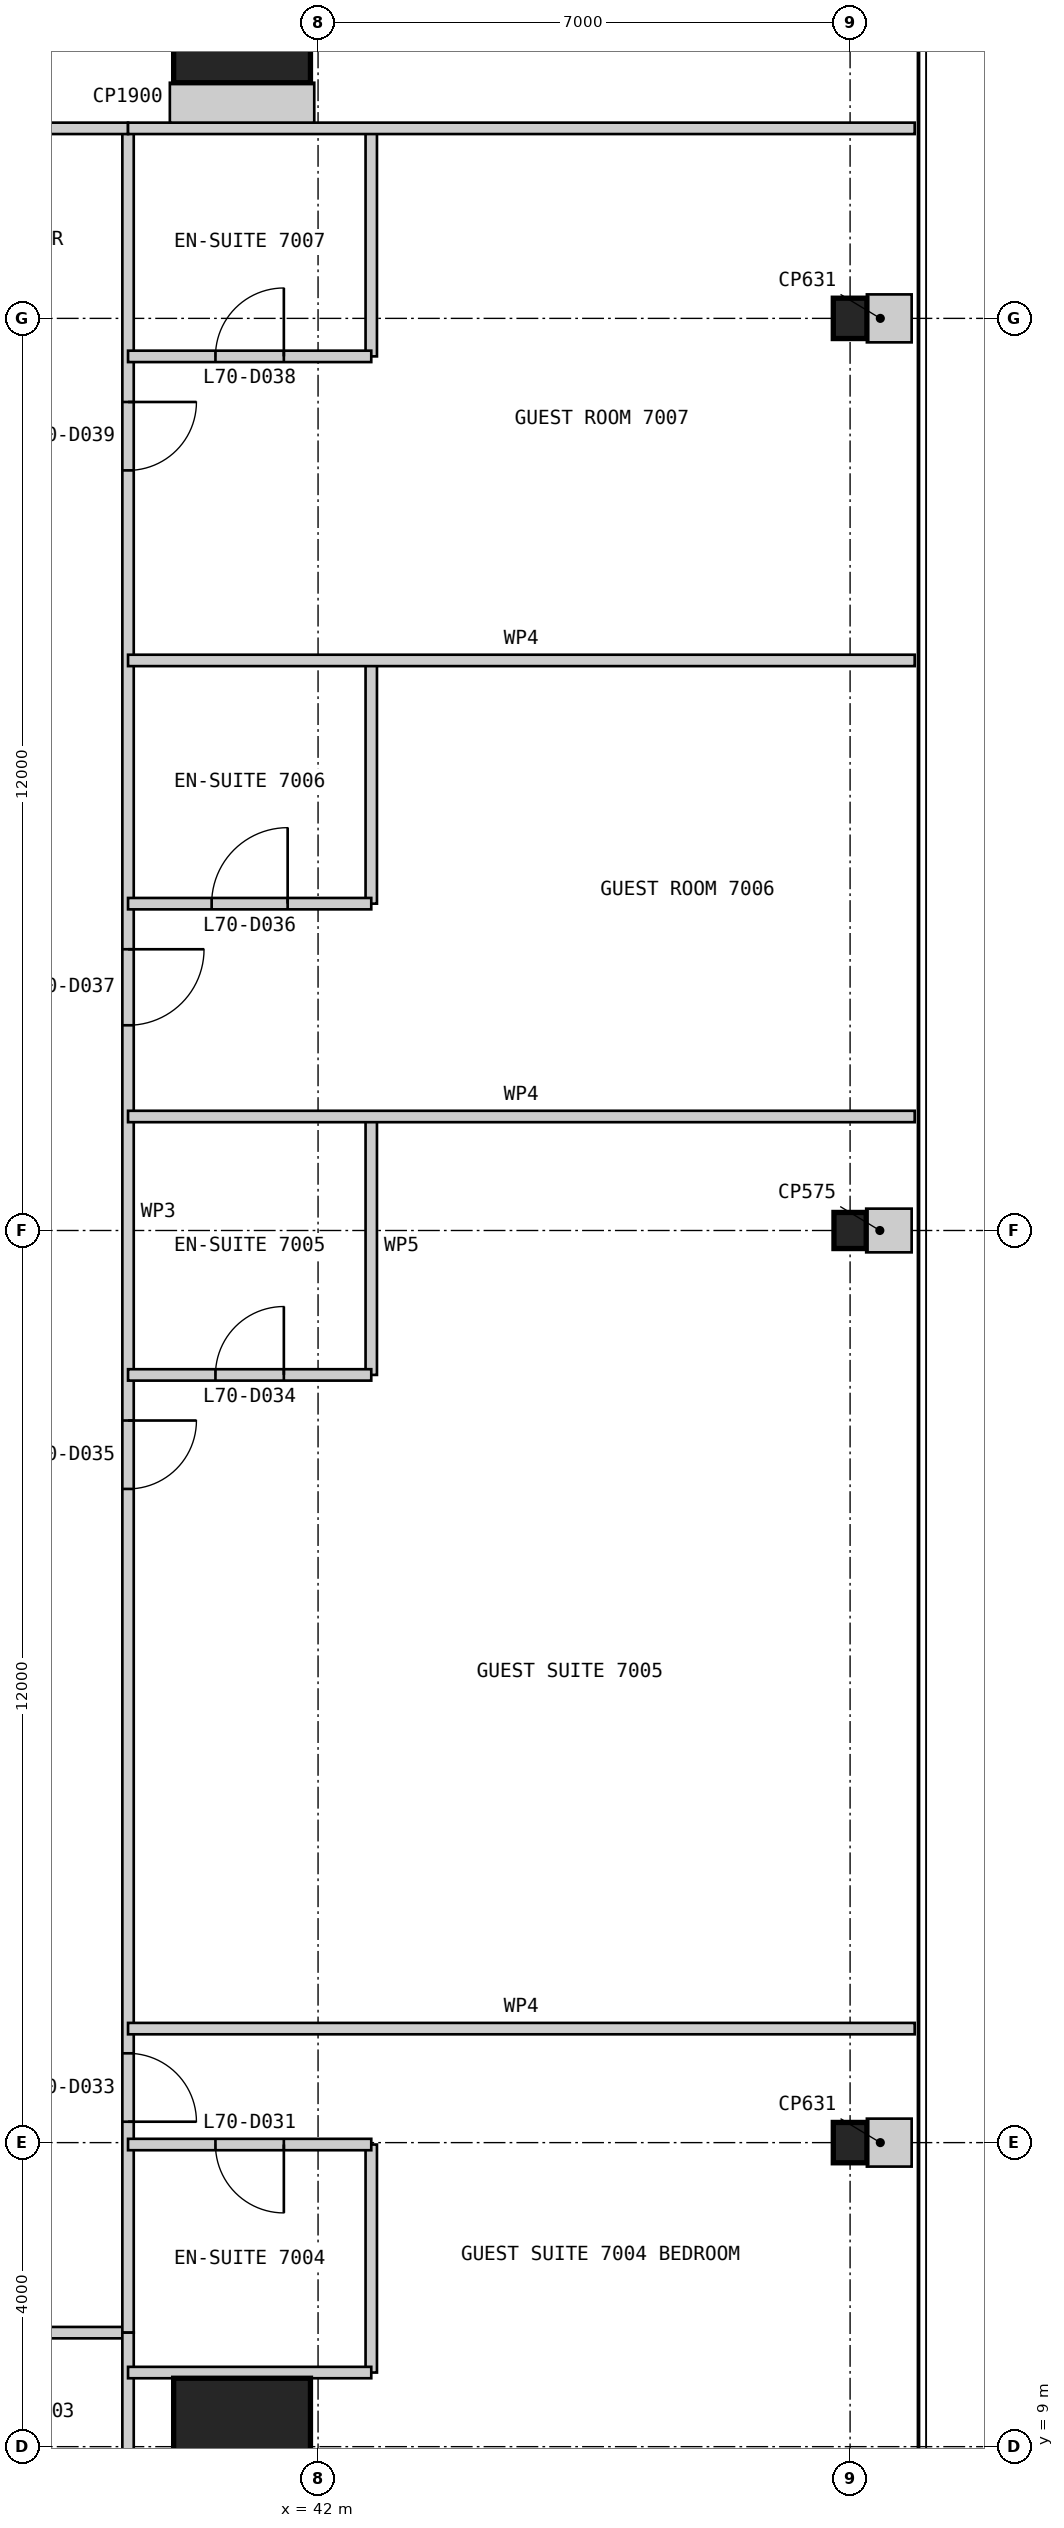
"""IFC4 building model, lengths in metres.
Left out: names, types, materials, properties, quantities, classifications, styles, units other than length and angle.
Written with IfcOpenShell. Run it as: python <this file> out.ifc"""

import sys

from ifc_helpers import new_model, si_unit, direction, frame, frame_2d, origin, origin_2d, place, context, subcontext, project, spatial, rectangle, i_section, extrude, element, fill, save


model = new_model("IFC4")
c1 = context("Model", 3, precision=1e-05, world=origin(), true_north=direction((0.0, 1.0)))
c2 = subcontext(c1, "Body", "Model", "MODEL_VIEW")
j1 = project(units=[si_unit("LENGTHUNIT", "METRE"), si_unit("PLANEANGLEUNIT", "RADIAN")], contexts=[c1])
p1 = place(None, origin())
s1 = spatial("IfcSite", under=j1, at=p1, CompositionType="ELEMENT")
p2 = place(p1, origin())
s2 = spatial("IfcBuilding", under=s1, at=p2, CompositionType="ELEMENT")
p3 = place(p2, frame((0.0, 0.0, 290.0)))
s3 = spatial("IfcBuildingStorey", under=s2, at=p3, CompositionType="ELEMENT", Elevation=290.0)
for number, where, z_axis, x_axis in (
    (1, (41.0, 9.0, 0.0), (0.0, 0.0, 1.0), (1.0, 0.0, 0.0)),
    (2, (41.0, 41.0, 0.0), (0.0, 0.0, 1.0), (1.0, 0.0, 0.0)),
):
    element("IfcColumn", number, at=place(p3, frame(where, z_axis=z_axis, x_axis=x_axis)), inside=s3, PredefinedType="COLUMN", context=c2, shape_type="SweptSolid", body=[
        extrude(rectangle(XDim=1.8, YDim=1.8, at=origin_2d()), origin(), (0.0, 0.0, 1.0), 3.4),
    ])
p4 = place(p3, frame((49.0, 13.0, 0.0), z_axis=(0.0, 0.0, 1.0), x_axis=(1.0, 0.0, 0.0)))
e3 = element("IfcColumn", 3, at=p4, inside=s3, PredefinedType="COLUMN", context=c2, shape_type="SweptSolid", body=[
    extrude(i_section(OverallWidth=0.442, OverallDepth=0.531, WebThickness=0.066, FlangeThickness=0.106, at=origin_2d()), origin(), (0.0, 0.0, 1.0), 3.4),
])
p5 = place(p3, frame((49.0, 25.0, 0.0), z_axis=(0.0, 0.0, 1.0), x_axis=(1.0, 0.0, 0.0)))
e4 = element("IfcColumn", 4, at=p5, inside=s3, PredefinedType="COLUMN", context=c2, shape_type="SweptSolid", body=[
    extrude(i_section(OverallWidth=0.424, OverallDepth=0.475, WebThickness=0.048, FlangeThickness=0.077, at=origin_2d()), origin(), (0.0, 0.0, 1.0), 3.4),
])
p6 = place(p3, frame((49.0, 37.0, 0.0), z_axis=(0.0, 0.0, 1.0), x_axis=(1.0, 0.0, 0.0)))
e5 = element("IfcColumn", 5, at=p6, inside=s3, PredefinedType="COLUMN", context=c2, shape_type="SweptSolid", body=[
    extrude(i_section(OverallWidth=0.442, OverallDepth=0.531, WebThickness=0.066, FlangeThickness=0.106, at=origin_2d()), origin(), (0.0, 0.0, 1.0), 3.4),
])
p7 = place(p3, frame((10.5, 10.5, 0.0), z_axis=(0.0, 0.0, 1.0), x_axis=(1.0, 0.0, 0.0)))
e6 = element("IfcWall", 6, at=p7, inside=s3, PredefinedType="PARTITIONING", context=c2, shape_type="SweptSolid", body=[
    extrude(rectangle(XDim=29.0, YDim=0.15, at=frame_2d((14.5, 0.0))), origin(), (0.0, 0.0, 1.0), 3.25),
])
p8 = place(p7, frame((1.85, 0.0, 0.0)))
e7 = element("IfcOpeningElement", 7, at=p8, cuts=e6, PredefinedType="OPENING", context=c2, shape_type="SweptSolid", body=[
    extrude(rectangle(XDim=0.9, YDim=2.1, at=frame_2d((0.45, 1.05))), frame((0.0, 0.085, 0.0), z_axis=(0.0, -1.0, 0.0), x_axis=(1.0, 0.0, 0.0)), (0.0, 0.0, 1.0), 0.17),
])
p9 = place(p7, frame((11.5, 0.0, 0.0)))
e8 = element("IfcOpeningElement", 8, at=p9, cuts=e6, PredefinedType="OPENING", context=c2, shape_type="SweptSolid", body=[
    extrude(rectangle(XDim=0.9, YDim=2.1, at=frame_2d((0.45, 1.05))), frame((0.0, 0.085, 0.0), z_axis=(0.0, -1.0, 0.0), x_axis=(1.0, 0.0, 0.0)), (0.0, 0.0, 1.0), 0.17),
])
p10 = place(p7, frame((24.1, 0.0, 0.0)))
e9 = element("IfcOpeningElement", 9, at=p10, cuts=e6, PredefinedType="OPENING", context=c2, shape_type="SweptSolid", body=[
    extrude(rectangle(XDim=0.9, YDim=2.1, at=frame_2d((0.45, 1.05))), frame((0.0, 0.085, 0.0), z_axis=(0.0, -1.0, 0.0), x_axis=(1.0, 0.0, 0.0)), (0.0, 0.0, 1.0), 0.17),
])
p11 = place(p3, frame((39.5, 10.5, 0.0), z_axis=(0.0, 0.0, 1.0), x_axis=(0.0, 1.0, 0.0)))
e10 = element("IfcWall", 10, at=p11, inside=s3, PredefinedType="PARTITIONING", context=c2, shape_type="SweptSolid", body=[
    extrude(rectangle(XDim=29.0, YDim=0.15, at=frame_2d((14.5, 0.0))), origin(), (0.0, 0.0, 1.0), 3.25),
])
p12 = place(p11, frame((2.775, 0.0, 0.0)))
e11 = element("IfcOpeningElement", 11, at=p12, cuts=e10, PredefinedType="OPENING", context=c2, shape_type="SweptSolid", body=[
    extrude(rectangle(XDim=0.9, YDim=2.1, at=frame_2d((0.45, 1.05))), frame((0.0, 0.085, 0.0), z_axis=(0.0, -1.0, 0.0), x_axis=(1.0, 0.0, 0.0)), (0.0, 0.0, 1.0), 0.17),
])
p13 = place(p11, frame((11.1, 0.0, 0.0)))
e12 = element("IfcOpeningElement", 12, at=p13, cuts=e10, PredefinedType="OPENING", context=c2, shape_type="SweptSolid", body=[
    extrude(rectangle(XDim=0.9, YDim=2.1, at=frame_2d((0.45, 1.05))), frame((0.0, 0.085, 0.0), z_axis=(0.0, -1.0, 0.0), x_axis=(1.0, 0.0, 0.0)), (0.0, 0.0, 1.0), 0.17),
])
p14 = place(p11, frame((17.2, 0.0, 0.0)))
e13 = element("IfcOpeningElement", 13, at=p14, cuts=e10, PredefinedType="OPENING", context=c2, shape_type="SweptSolid", body=[
    extrude(rectangle(XDim=1.0, YDim=2.1, at=frame_2d((0.5, 1.05))), frame((0.0, 0.085, 0.0), z_axis=(0.0, -1.0, 0.0), x_axis=(1.0, 0.0, 0.0)), (0.0, 0.0, 1.0), 0.17),
])
p15 = place(p11, frame((24.5, 0.0, 0.0)))
e14 = element("IfcOpeningElement", 14, at=p15, cuts=e10, PredefinedType="OPENING", context=c2, shape_type="SweptSolid", body=[
    extrude(rectangle(XDim=0.9, YDim=2.1, at=frame_2d((0.45, 1.05))), frame((0.0, 0.085, 0.0), z_axis=(0.0, -1.0, 0.0), x_axis=(1.0, 0.0, 0.0)), (0.0, 0.0, 1.0), 0.17),
])
p16 = place(p3, frame((39.5, 0.15, 0.0), z_axis=(0.0, 0.0, 1.0), x_axis=(0.0, 1.0, 0.0)))
e15 = element("IfcWall", 15, at=p16, inside=s3, PredefinedType="PARTITIONING", context=c2, shape_type="SweptSolid", body=[
    extrude(rectangle(XDim=10.35, YDim=0.15, at=frame_2d((5.175, 0.0))), origin(), (0.0, 0.0, 1.0), 3.25),
])
p17 = place(p3, frame((42.7, 9.975, 0.0), z_axis=(0.0, 0.0, 1.0), x_axis=(0.0, 1.0, 0.0)))
e16 = element("IfcWall", 16, at=p17, inside=s3, PredefinedType="PARTITIONING", context=c2, shape_type="SweptSolid", body=[
    extrude(rectangle(XDim=3.0, YDim=0.15, at=frame_2d((1.5, 0.0))), origin(), (0.0, 0.0, 1.0), 3.25),
])
p18 = place(p3, frame((42.7, 12.975, 0.0), z_axis=(0.0, 0.0, 1.0), x_axis=(-1.0, 0.0, 0.0)))
e17 = element("IfcWall", 17, at=p18, inside=s3, PredefinedType="PARTITIONING", context=c2, shape_type="SweptSolid", body=[
    extrude(rectangle(XDim=3.2, YDim=0.15, at=frame_2d((1.6, 0.0))), origin(), (0.0, 0.0, 1.0), 2.404),
])
p19 = place(p18, frame((1.15, 0.0, 0.0)))
e18 = element("IfcOpeningElement", 18, at=p19, cuts=e17, PredefinedType="OPENING", context=c2, shape_type="SweptSolid", body=[
    extrude(rectangle(XDim=0.9, YDim=2.1, at=frame_2d((0.45, 1.05))), frame((0.0, 0.085, 0.0), z_axis=(0.0, -1.0, 0.0), x_axis=(1.0, 0.0, 0.0)), (0.0, 0.0, 1.0), 0.17),
])
p20 = place(p3, frame((42.7, 9.975, 0.0), z_axis=(0.0, 0.0, 1.0), x_axis=(-1.0, 0.0, 0.0)))
e19 = element("IfcWall", 19, at=p20, inside=s3, PredefinedType="PARTITIONING", context=c2, shape_type="SweptSolid", body=[
    extrude(rectangle(XDim=3.2, YDim=0.15, at=frame_2d((1.6, 0.0))), origin(), (0.0, 0.0, 1.0), 3.25),
])
p21 = place(p3, frame((49.85, 14.5, 0.0), z_axis=(0.0, 0.0, 1.0), x_axis=(-1.0, 0.0, 0.0)))
e20 = element("IfcWall", 20, at=p21, inside=s3, PredefinedType="PARTITIONING", context=c2, shape_type="SweptSolid", body=[
    extrude(rectangle(XDim=10.35, YDim=0.15, at=frame_2d((5.175, 0.0))), origin(), (0.0, 0.0, 1.0), 3.25),
])
p22 = place(p3, frame((42.7, 23.1, 0.0), z_axis=(0.0, 0.0, 1.0), x_axis=(0.0, 1.0, 0.0)))
e21 = element("IfcWall", 21, at=p22, inside=s3, PredefinedType="PARTITIONING", context=c2, shape_type="SweptSolid", body=[
    extrude(rectangle(XDim=3.4, YDim=0.15, at=frame_2d((1.7, 0.0))), origin(), (0.0, 0.0, 1.0), 3.25),
])
p23 = place(p3, frame((42.7, 23.1, 0.0), z_axis=(0.0, 0.0, 1.0), x_axis=(-1.0, 0.0, 0.0)))
e22 = element("IfcWall", 22, at=p23, inside=s3, PredefinedType="PARTITIONING", context=c2, shape_type="SweptSolid", body=[
    extrude(rectangle(XDim=3.2, YDim=0.15, at=frame_2d((1.6, 0.0))), origin(), (0.0, 0.0, 1.0), 3.25),
])
p24 = place(p23, frame((1.15, 0.0, 0.0)))
e23 = element("IfcOpeningElement", 23, at=p24, cuts=e22, PredefinedType="OPENING", context=c2, shape_type="SweptSolid", body=[
    extrude(rectangle(XDim=0.9, YDim=2.1, at=frame_2d((0.45, 1.05))), frame((0.0, 0.085, 0.0), z_axis=(0.0, -1.0, 0.0), x_axis=(1.0, 0.0, 0.0)), (0.0, 0.0, 1.0), 0.17),
])
p25 = place(p3, frame((49.85, 26.5, 0.0), z_axis=(0.0, 0.0, 1.0), x_axis=(-1.0, 0.0, 0.0)))
e24 = element("IfcWall", 24, at=p25, inside=s3, PredefinedType="PARTITIONING", context=c2, shape_type="SweptSolid", body=[
    extrude(rectangle(XDim=10.35, YDim=0.15, at=frame_2d((5.175, 0.0))), origin(), (0.0, 0.0, 1.0), 3.25),
])
p26 = place(p3, frame((42.7, 29.3, 0.0), z_axis=(0.0, 0.0, 1.0), x_axis=(0.0, 1.0, 0.0)))
e25 = element("IfcWall", 25, at=p26, inside=s3, PredefinedType="PARTITIONING", context=c2, shape_type="SweptSolid", body=[
    extrude(rectangle(XDim=3.2, YDim=0.15, at=frame_2d((1.6, 0.0))), origin(), (0.0, 0.0, 1.0), 3.25),
])
p27 = place(p3, frame((42.7, 29.3, 0.0), z_axis=(0.0, 0.0, 1.0), x_axis=(-1.0, 0.0, 0.0)))
e26 = element("IfcWall", 26, at=p27, inside=s3, PredefinedType="PARTITIONING", context=c2, shape_type="SweptSolid", body=[
    extrude(rectangle(XDim=3.2, YDim=0.15, at=frame_2d((1.6, 0.0))), origin(), (0.0, 0.0, 1.0), 3.25),
])
p28 = place(p27, frame((1.1, 0.0, 0.0)))
e27 = element("IfcOpeningElement", 27, at=p28, cuts=e26, PredefinedType="OPENING", context=c2, shape_type="SweptSolid", body=[
    extrude(rectangle(XDim=1.0, YDim=2.1, at=frame_2d((0.5, 1.05))), frame((0.0, 0.085, 0.0), z_axis=(0.0, -1.0, 0.0), x_axis=(1.0, 0.0, 0.0)), (0.0, 0.0, 1.0), 0.17),
])
p29 = place(p3, frame((49.85, 32.5, 0.0), z_axis=(0.0, 0.0, 1.0), x_axis=(-1.0, 0.0, 0.0)))
e28 = element("IfcWall", 28, at=p29, inside=s3, PredefinedType="PARTITIONING", context=c2, shape_type="SweptSolid", body=[
    extrude(rectangle(XDim=10.35, YDim=0.15, at=frame_2d((5.175, 0.0))), origin(), (0.0, 0.0, 1.0), 3.25),
])
p30 = place(p3, frame((42.7, 36.5, 0.0), z_axis=(0.0, 0.0, 1.0), x_axis=(0.0, 1.0, 0.0)))
e29 = element("IfcWall", 29, at=p30, inside=s3, PredefinedType="PARTITIONING", context=c2, shape_type="SweptSolid", body=[
    extrude(rectangle(XDim=3.0, YDim=0.15, at=frame_2d((1.5, 0.0))), origin(), (0.0, 0.0, 1.0), 3.25),
])
p31 = place(p3, frame((42.7, 36.5, 0.0), z_axis=(0.0, 0.0, 1.0), x_axis=(-1.0, 0.0, 0.0)))
e30 = element("IfcWall", 30, at=p31, inside=s3, PredefinedType="PARTITIONING", context=c2, shape_type="SweptSolid", body=[
    extrude(rectangle(XDim=3.2, YDim=0.15, at=frame_2d((1.6, 0.0))), origin(), (0.0, 0.0, 1.0), 3.25),
])
p32 = place(p31, frame((1.15, 0.0, 0.0)))
e31 = element("IfcOpeningElement", 31, at=p32, cuts=e30, PredefinedType="OPENING", context=c2, shape_type="SweptSolid", body=[
    extrude(rectangle(XDim=0.9, YDim=2.1, at=frame_2d((0.45, 1.05))), frame((0.0, 0.085, 0.0), z_axis=(0.0, -1.0, 0.0), x_axis=(1.0, 0.0, 0.0)), (0.0, 0.0, 1.0), 0.17),
])
p33 = place(p3, frame((39.5, 39.5, 0.0), z_axis=(0.0, 0.0, 1.0), x_axis=(-1.0, 0.0, 0.0)))
e32 = element("IfcWall", 32, at=p33, inside=s3, PredefinedType="PARTITIONING", context=c2, shape_type="SweptSolid", body=[
    extrude(rectangle(XDim=29.0, YDim=0.15, at=frame_2d((14.5, 0.0))), origin(), (0.0, 0.0, 1.0), 3.25),
])
p34 = place(p33, frame((1.85, 0.0, 0.0)))
e33 = element("IfcOpeningElement", 33, at=p34, cuts=e32, PredefinedType="OPENING", context=c2, shape_type="SweptSolid", body=[
    extrude(rectangle(XDim=0.9, YDim=2.1, at=frame_2d((0.45, 1.05))), frame((0.0, 0.085, 0.0), z_axis=(0.0, -1.0, 0.0), x_axis=(1.0, 0.0, 0.0)), (0.0, 0.0, 1.0), 0.17),
])
p35 = place(p33, frame((11.5, 0.0, 0.0)))
e34 = element("IfcOpeningElement", 34, at=p35, cuts=e32, PredefinedType="OPENING", context=c2, shape_type="SweptSolid", body=[
    extrude(rectangle(XDim=0.9, YDim=2.1, at=frame_2d((0.45, 1.05))), frame((0.0, 0.085, 0.0), z_axis=(0.0, -1.0, 0.0), x_axis=(1.0, 0.0, 0.0)), (0.0, 0.0, 1.0), 0.17),
])
p36 = place(p33, frame((24.1, 0.0, 0.0)))
e35 = element("IfcOpeningElement", 35, at=p36, cuts=e32, PredefinedType="OPENING", context=c2, shape_type="SweptSolid", body=[
    extrude(rectangle(XDim=0.9, YDim=2.1, at=frame_2d((0.45, 1.05))), frame((0.0, 0.085, 0.0), z_axis=(0.0, -1.0, 0.0), x_axis=(1.0, 0.0, 0.0)), (0.0, 0.0, 1.0), 0.17),
])
p37 = place(p3, frame((49.85, 39.5, 0.0), z_axis=(0.0, 0.0, 1.0), x_axis=(-1.0, 0.0, 0.0)))
e36 = element("IfcWall", 36, at=p37, inside=s3, PredefinedType="PARTITIONING", context=c2, shape_type="SweptSolid", body=[
    extrude(rectangle(XDim=10.35, YDim=0.15, at=frame_2d((5.175, 0.0))), origin(), (0.0, 0.0, 1.0), 3.25),
])
p38 = place(p3, frame((49.81, 13.0, 0.0), z_axis=(0.0, 0.0, 1.0), x_axis=(-1.0, 0.0, 0.0)))
e37 = element("IfcWall", 37, at=p38, inside=s3, PredefinedType="PARTITIONING", context=c2, shape_type="SweptSolid", body=[
    extrude(rectangle(XDim=0.589, YDim=0.631, at=frame_2d((0.294, 0.0))), origin(), (0.0, 0.0, 1.0), 3.25),
])
p39 = place(p3, frame((49.81, 25.0, 0.0), z_axis=(0.0, 0.0, 1.0), x_axis=(-1.0, 0.0, 0.0)))
e38 = element("IfcWall", 38, at=p39, inside=s3, PredefinedType="PARTITIONING", context=c2, shape_type="SweptSolid", body=[
    extrude(rectangle(XDim=0.598, YDim=0.575, at=frame_2d((0.299, 0.0))), origin(), (0.0, 0.0, 1.0), 3.25),
])
p40 = place(p3, frame((49.81, 37.0, 0.0), z_axis=(0.0, 0.0, 1.0), x_axis=(-1.0, 0.0, 0.0)))
e39 = element("IfcWall", 39, at=p40, inside=s3, PredefinedType="PARTITIONING", context=c2, shape_type="SweptSolid", body=[
    extrude(rectangle(XDim=0.589, YDim=0.631, at=frame_2d((0.294, 0.0))), origin(), (0.0, 0.0, 1.0), 3.25),
])
p41 = place(p3, frame((41.0, 39.575, 0.0), z_axis=(0.0, 0.0, 1.0), x_axis=(0.0, 1.0, 0.0)))
e40 = element("IfcWall", 40, at=p41, inside=s3, PredefinedType="PARTITIONING", context=c2, shape_type="SweptSolid", body=[
    extrude(rectangle(XDim=0.525, YDim=1.9, at=frame_2d((0.263, 0.0))), origin(), (0.0, 0.0, 1.0), 3.25),
])
p42 = place(p19, origin())
e41 = element("IfcDoor", 41, at=p42, inside=s3, OperationType="SINGLE_SWING_LEFT", PredefinedType="DOOR", context=c2, shape_type="SweptSolid", body=[
    extrude(rectangle(XDim=0.9, YDim=2.1, at=frame_2d((0.45, 1.05))), frame((0.0, 0.025, 0.0), z_axis=(0.0, -1.0, 0.0), x_axis=(1.0, 0.0, 0.0)), (0.0, 0.0, 1.0), 0.05),
])
fill(e18, e41)
p43 = place(p12, frame((0.9, 0.0, 0.0), z_axis=(0.0, 0.0, 1.0), x_axis=(-1.0, 0.0, 0.0)))
e42 = element("IfcDoor", 42, at=p43, inside=s3, OperationType="SINGLE_SWING_RIGHT", PredefinedType="DOOR", context=c2, shape_type="SweptSolid", body=[
    extrude(rectangle(XDim=0.9, YDim=2.1, at=frame_2d((0.45, 1.05))), frame((0.0, 0.025, 0.0), z_axis=(0.0, -1.0, 0.0), x_axis=(1.0, 0.0, 0.0)), (0.0, 0.0, 1.0), 0.05),
])
fill(e11, e42)
p44 = place(p24, frame((0.9, 0.0, 0.0), z_axis=(0.0, 0.0, 1.0), x_axis=(-1.0, 0.0, 0.0)))
e43 = element("IfcDoor", 43, at=p44, inside=s3, OperationType="SINGLE_SWING_RIGHT", PredefinedType="DOOR", context=c2, shape_type="SweptSolid", body=[
    extrude(rectangle(XDim=0.9, YDim=2.1, at=frame_2d((0.45, 1.05))), frame((0.0, 0.025, 0.0), z_axis=(0.0, -1.0, 0.0), x_axis=(1.0, 0.0, 0.0)), (0.0, 0.0, 1.0), 0.05),
])
fill(e23, e43)
p45 = place(p13, frame((0.9, 0.0, 0.0), z_axis=(0.0, 0.0, 1.0), x_axis=(-1.0, 0.0, 0.0)))
e44 = element("IfcDoor", 44, at=p45, inside=s3, OperationType="SINGLE_SWING_LEFT", PredefinedType="DOOR", context=c2, shape_type="SweptSolid", body=[
    extrude(rectangle(XDim=0.9, YDim=2.1, at=frame_2d((0.45, 1.05))), frame((0.0, 0.025, 0.0), z_axis=(0.0, -1.0, 0.0), x_axis=(1.0, 0.0, 0.0)), (0.0, 0.0, 1.0), 0.05),
])
fill(e12, e44)
p46 = place(p28, frame((1.0, 0.0, 0.0), z_axis=(0.0, 0.0, 1.0), x_axis=(-1.0, 0.0, 0.0)))
e45 = element("IfcDoor", 45, at=p46, inside=s3, OperationType="SINGLE_SWING_RIGHT", PredefinedType="DOOR", context=c2, shape_type="SweptSolid", body=[
    extrude(rectangle(XDim=1.0, YDim=2.1, at=frame_2d((0.5, 1.05))), frame((0.0, 0.025, 0.0), z_axis=(0.0, -1.0, 0.0), x_axis=(1.0, 0.0, 0.0)), (0.0, 0.0, 1.0), 0.05),
])
fill(e27, e45)
p47 = place(p14, frame((1.0, 0.0, 0.0), z_axis=(0.0, 0.0, 1.0), x_axis=(-1.0, 0.0, 0.0)))
e46 = element("IfcDoor", 46, at=p47, inside=s3, OperationType="SINGLE_SWING_LEFT", PredefinedType="DOOR", context=c2, shape_type="SweptSolid", body=[
    extrude(rectangle(XDim=1.0, YDim=2.1, at=frame_2d((0.5, 1.05))), frame((0.0, 0.025, 0.0), z_axis=(0.0, -1.0, 0.0), x_axis=(1.0, 0.0, 0.0)), (0.0, 0.0, 1.0), 0.05),
])
fill(e13, e46)
p48 = place(p32, frame((0.9, 0.0, 0.0), z_axis=(0.0, 0.0, 1.0), x_axis=(-1.0, 0.0, 0.0)))
e47 = element("IfcDoor", 47, at=p48, inside=s3, OperationType="SINGLE_SWING_RIGHT", PredefinedType="DOOR", context=c2, shape_type="SweptSolid", body=[
    extrude(rectangle(XDim=0.9, YDim=2.1, at=frame_2d((0.45, 1.05))), frame((0.0, 0.025, 0.0), z_axis=(0.0, -1.0, 0.0), x_axis=(1.0, 0.0, 0.0)), (0.0, 0.0, 1.0), 0.05),
])
fill(e31, e47)
p49 = place(p15, frame((0.9, 0.0, 0.0), z_axis=(0.0, 0.0, 1.0), x_axis=(-1.0, 0.0, 0.0)))
e48 = element("IfcDoor", 48, at=p49, inside=s3, OperationType="SINGLE_SWING_LEFT", PredefinedType="DOOR", context=c2, shape_type="SweptSolid", body=[
    extrude(rectangle(XDim=0.9, YDim=2.1, at=frame_2d((0.45, 1.05))), frame((0.0, 0.025, 0.0), z_axis=(0.0, -1.0, 0.0), x_axis=(1.0, 0.0, 0.0)), (0.0, 0.0, 1.0), 0.05),
])
fill(e14, e48)
save(model, sys.argv[1])
